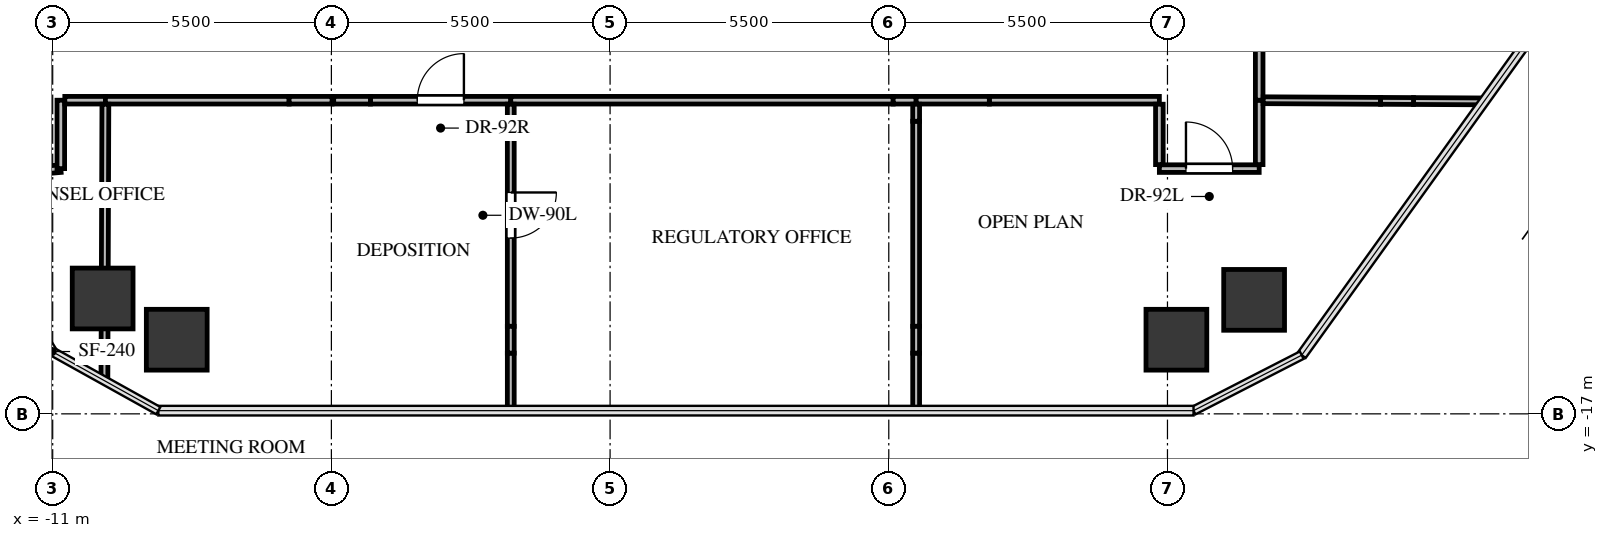
"""IFC4 building model, lengths in metres.
Left out: names, types, materials, properties, quantities, classifications, styles, units other than length and angle.
Written with IfcOpenShell. Run it as: python <this file> out.ifc"""

import sys

from ifc_helpers import new_model, si_unit, direction, frame, frame_2d, origin, origin_2d, place, context, subcontext, project, spatial, rectangle, extrude, source, transform, mapped, element, fill, save


model = new_model("IFC4")
c1 = context("Model", 3, precision=1e-05, world=origin(), true_north=direction((0.0, 1.0)))
c2 = subcontext(c1, "Body", "Model", "MODEL_VIEW")
j1 = project(units=[si_unit("LENGTHUNIT", "METRE"), si_unit("PLANEANGLEUNIT", "RADIAN")], contexts=[c1])
p1 = place(None, origin())
s1 = spatial("IfcSite", under=j1, at=p1, CompositionType="ELEMENT")
p2 = place(p1, origin())
s2 = spatial("IfcBuilding", under=s1, at=p2, CompositionType="ELEMENT")
p3 = place(p2, frame((0.0, 0.0, 143.1)))
s3 = spatial("IfcBuildingStorey", under=s2, at=p3, CompositionType="ELEMENT", Elevation=143.1)
m1 = source(origin(), c2, "Body", "SweptSolid", [
    extrude(rectangle(XDim=1.2, YDim=1.2, at=origin_2d()), origin(), (0.0, 0.0, 1.0), 3.0),
])
for number, where, z_axis, x_axis in (
    (1, (-10.014, -14.723, -0.24), (0.0, 0.0, 1.0), (1.0, 0.0, 0.0)),
    (2, (12.71, -14.75, -0.24), (0.0, 0.0, 1.0), (1.0, 0.0, 0.0)),
    (3, (11.176, -15.537, -0.24), (0.0, 0.0, 1.0), (1.0, 0.0, 0.0)),
    (4, (-8.552, -15.537, -0.24), (0.0, 0.0, 1.0), (1.0, 0.0, 0.0)),
):
    element("IfcColumn", number, at=place(p3, frame(where, z_axis=z_axis, x_axis=x_axis)), inside=s3, PredefinedType="COLUMN", context=c2, shape_type="MappedRepresentation", body=[
        mapped(m1, transform((0.0, 0.0, 0.0), x_axis=(1.0, 0.0, 0.0), y_axis=(0.0, 1.0, 0.0), z_axis=(0.0, 0.0, 1.0), scale=1.0)),
    ])
p4 = place(p3, frame((-11.27, -12.197, 0.0), z_axis=(0.0, 0.0, 1.0), x_axis=(0.996291394281, 0.086043347688, 0.0)))
e5 = element("IfcWall", 5, at=p4, inside=s3, PredefinedType="PARTITIONING", context=c2, shape_type="SweptSolid", body=[
    extrude(rectangle(XDim=0.431, YDim=0.15, at=frame_2d((0.216, 0.0))), origin(), (0.0, 0.0, 1.0), 2.745),
])
p5 = place(p3, frame((-10.84, -12.16, 0.0), z_axis=(0.0, 0.0, 1.0), x_axis=(0.0, 1.0, 0.0)))
e6 = element("IfcWall", 6, at=p5, inside=s3, PredefinedType="PARTITIONING", context=c2, shape_type="SweptSolid", body=[
    extrude(rectangle(XDim=1.35, YDim=0.15, at=frame_2d((0.675, 0.0))), origin(), (0.0, 0.0, 1.0), 2.745),
])
p6 = place(p3, frame((-10.761, -10.81, 0.0), z_axis=(0.0, 0.0, 1.0), x_axis=(1.0, 0.0, 0.0)))
e7 = element("IfcWall", 7, at=p6, inside=s3, PredefinedType="PARTITIONING", context=c2, shape_type="SweptSolid", body=[
    extrude(rectangle(XDim=0.801, YDim=0.15, at=frame_2d((0.4, 0.0))), origin(), (0.0, 0.0, 1.0), 2.745),
])
p7 = place(p3, frame((-9.96, -10.81, 0.0), z_axis=(0.0, 0.0, 1.0), x_axis=(1.0, 0.0, 0.0)))
e8 = element("IfcWall", 8, at=p7, inside=s3, PredefinedType="PARTITIONING", context=c2, shape_type="SweptSolid", body=[
    extrude(rectangle(XDim=3.625, YDim=0.15, at=frame_2d((1.813, 0.0))), origin(), (0.0, 0.0, 1.0), 1.912),
])
p8 = place(p3, frame((-4.729, -10.81, 0.0), z_axis=(0.0, 0.0, 1.0), x_axis=(1.0, 0.0, 0.0)))
e9 = element("IfcWall", 9, at=p8, inside=s3, PredefinedType="PARTITIONING", context=c2, shape_type="SweptSolid", body=[
    extrude(rectangle(XDim=2.77, YDim=0.15, at=frame_2d((1.385, 0.0))), origin(), (0.0, 0.0, 1.0), 2.745),
])
p9 = place(p8, frame((0.925, 0.0, 0.0)))
e10 = element("IfcOpeningElement", 10, at=p9, cuts=e9, PredefinedType="OPENING", context=c2, shape_type="SweptSolid", body=[
    extrude(rectangle(XDim=0.92, YDim=2.1, at=frame_2d((0.46, 1.05))), frame((0.0, 0.085, 0.0), z_axis=(0.0, -1.0, 0.0), x_axis=(1.0, 0.0, 0.0)), (0.0, 0.0, 1.0), 0.17),
])
p10 = place(p3, frame((-6.334, -10.81, 0.0), z_axis=(0.0, 0.0, 1.0), x_axis=(1.0, 0.0, 0.0)))
e11 = element("IfcWall", 11, at=p10, inside=s3, PredefinedType="PARTITIONING", context=c2, shape_type="SweptSolid", body=[
    extrude(rectangle(XDim=0.848, YDim=0.15, at=frame_2d((0.424, 0.0))), origin(), (0.0, 0.0, 1.0), 1.912),
])
p11 = place(p3, frame((-5.455, -10.81, 0.0), z_axis=(0.0, 0.0, 1.0), x_axis=(1.0, 0.0, 0.0)))
e12 = element("IfcWall", 12, at=p11, inside=s3, PredefinedType="PARTITIONING", context=c2, shape_type="SweptSolid", body=[
    extrude(rectangle(XDim=0.725, YDim=0.15, at=frame_2d((0.363, 0.0))), origin(), (0.0, 0.0, 1.0), 1.912),
])
p12 = place(p3, frame((-1.96, -10.81, 0.0), z_axis=(0.0, 0.0, 1.0), x_axis=(1.0, 0.0, 0.0)))
e13 = element("IfcWall", 13, at=p12, inside=s3, PredefinedType="PARTITIONING", context=c2, shape_type="SweptSolid", body=[
    extrude(rectangle(XDim=7.547, YDim=0.15, at=frame_2d((3.773, 0.0))), origin(), (0.0, 0.0, 1.0), 1.912),
])
p13 = place(p3, frame((5.587, -10.81, 0.0), z_axis=(0.0, 0.0, 1.0), x_axis=(1.0, 0.0, 0.0)))
e14 = element("IfcWall", 14, at=p13, inside=s3, PredefinedType="PARTITIONING", context=c2, shape_type="SweptSolid", body=[
    extrude(rectangle(XDim=0.453, YDim=0.15, at=frame_2d((0.227, 0.0))), origin(), (0.0, 0.0, 1.0), 1.912),
])
p14 = place(p3, frame((7.484, -10.81, 0.0), z_axis=(0.0, 0.0, 1.0), x_axis=(1.0, 0.0, 0.0)))
e15 = element("IfcWall", 15, at=p14, inside=s3, PredefinedType="PARTITIONING", context=c2, shape_type="SweptSolid", body=[
    extrude(rectangle(XDim=3.356, YDim=0.15, at=frame_2d((1.678, 0.0))), origin(), (0.0, 0.0, 1.0), 1.912),
])
p15 = place(p3, frame((6.04, -10.81, 0.0), z_axis=(0.0, 0.0, 1.0), x_axis=(1.0, 0.0, 0.0)))
e16 = element("IfcWall", 16, at=p15, inside=s3, PredefinedType="PARTITIONING", context=c2, shape_type="SweptSolid", body=[
    extrude(rectangle(XDim=1.444, YDim=0.15, at=frame_2d((0.722, 0.0))), origin(), (0.0, 0.0, 1.0), 1.912),
])
p16 = place(p3, frame((10.84, -12.16, 0.0), z_axis=(0.0, 0.0, 1.0), x_axis=(1.0, 0.0, 0.0)))
e17 = element("IfcWall", 17, at=p16, inside=s3, PredefinedType="PARTITIONING", context=c2, shape_type="SweptSolid", body=[
    extrude(rectangle(XDim=1.97, YDim=0.15, at=frame_2d((0.985, 0.0))), origin(), (0.0, 0.0, 1.0), 2.745),
])
p17 = place(p16, frame((0.525, 0.0, 0.0)))
e18 = element("IfcOpeningElement", 18, at=p17, cuts=e17, PredefinedType="OPENING", context=c2, shape_type="SweptSolid", body=[
    extrude(rectangle(XDim=0.92, YDim=2.1, at=frame_2d((0.46, 1.05))), frame((0.0, 0.085, 0.0), z_axis=(0.0, -1.0, 0.0), x_axis=(1.0, 0.0, 0.0)), (0.0, 0.0, 1.0), 0.17),
])
p18 = place(p3, frame((10.84, -10.889, 0.0), z_axis=(0.0, 0.0, 1.0), x_axis=(0.0, -1.0, 0.0)))
e19 = element("IfcWall", 19, at=p18, inside=s3, PredefinedType="PARTITIONING", context=c2, shape_type="SweptSolid", body=[
    extrude(rectangle(XDim=1.192, YDim=0.15, at=frame_2d((0.596, 0.0))), origin(), (0.0, 0.0, 1.0), 2.745),
])
p19 = place(p3, frame((12.81, -12.081, 0.0), z_axis=(0.0, 0.0, 1.0), x_axis=(0.0, 1.0, 0.0)))
e20 = element("IfcWall", 20, at=p19, inside=s3, PredefinedType="PARTITIONING", context=c2, shape_type="SweptSolid", body=[
    extrude(rectangle(XDim=1.271, YDim=0.15, at=frame_2d((0.635, 0.0))), origin(), (0.0, 0.0, 1.0), 2.745),
])
p20 = place(p3, frame((12.81, -10.81, 0.0), z_axis=(0.0, 0.0, 1.0), x_axis=(0.0, 1.0, 0.0)))
e21 = element("IfcWall", 21, at=p20, inside=s3, PredefinedType="PARTITIONING", context=c2, shape_type="SweptSolid", body=[
    extrude(rectangle(XDim=2.37, YDim=0.15, at=frame_2d((1.185, 0.0))), origin(), (0.0, 0.0, 1.0), 2.745),
])
p21 = place(p3, frame((-9.96, -10.889, 0.0), z_axis=(0.0, 0.0, 1.0), x_axis=(-0.003528457908, -0.999993774973, 0.0)))
e22 = element("IfcWall", 22, at=p21, inside=s3, PredefinedType="PARTITIONING", context=c2, shape_type="SweptSolid", body=[
    extrude(rectangle(XDim=3.39, YDim=0.135, at=frame_2d((1.695, 0.0))), origin(), (0.0, 0.0, 1.0), 1.912),
])
p22 = place(p3, frame((-9.975, -15.048, 0.0), z_axis=(0.0, 0.0, 1.0), x_axis=(-0.003576784349, -0.999993603286, 0.0)))
e23 = element("IfcWall", 23, at=p22, inside=s3, PredefinedType="PARTITIONING", context=c2, shape_type="SweptSolid", body=[
    extrude(rectangle(XDim=1.297, YDim=0.135, at=frame_2d((0.648, 0.0))), origin(), (0.0, 0.0, 1.0), 2.745),
])
p23 = place(p3, frame((-9.972, -14.279, 0.0), z_axis=(0.0, 0.0, 1.0), x_axis=(-0.003494260751, -0.999993895052, 0.0)))
e24 = element("IfcWall", 24, at=p23, inside=s3, PredefinedType="PARTITIONING", context=c2, shape_type="SweptSolid", body=[
    extrude(rectangle(XDim=0.769, YDim=0.135, at=frame_2d((0.384, 0.0))), origin(), (0.0, 0.0, 1.0), 1.577),
])
p24 = place(p3, frame((-1.96, -10.889, 0.0), z_axis=(0.0, 0.0, 1.0), x_axis=(0.0, -1.0, 0.0)))
e25 = element("IfcWall", 25, at=p24, inside=s3, PredefinedType="PARTITIONING", context=c2, shape_type="SweptSolid", body=[
    extrude(rectangle(XDim=4.384, YDim=0.135, at=frame_2d((2.192, 0.0))), origin(), (0.0, 0.0, 1.0), 2.745),
])
p25 = place(p24, frame((1.742, 0.0, 0.0)))
e26 = element("IfcOpeningElement", 26, at=p25, cuts=e25, PredefinedType="OPENING", context=c2, shape_type="SweptSolid", body=[
    extrude(rectangle(XDim=0.9, YDim=2.05, at=frame_2d((0.45, 1.025))), frame((0.0, 0.078, 0.0), z_axis=(0.0, -1.0, 0.0), x_axis=(1.0, 0.0, 0.0)), (0.0, 0.0, 1.0), 0.155),
])
p26 = place(p3, frame((-1.96, -15.802, 0.0), z_axis=(0.0, 0.0, 1.0), x_axis=(0.0, -1.0, 0.0)))
e27 = element("IfcWall", 27, at=p26, inside=s3, PredefinedType="PARTITIONING", context=c2, shape_type="SweptSolid", body=[
    extrude(rectangle(XDim=1.135, YDim=0.135, at=frame_2d((0.568, 0.0))), origin(), (0.0, 0.0, 1.0), 2.745),
])
p27 = place(p3, frame((-1.96, -15.272, 0.0), z_axis=(0.0, 0.0, 1.0), x_axis=(0.0, -1.0, 0.0)))
e28 = element("IfcWall", 28, at=p27, inside=s3, PredefinedType="PARTITIONING", context=c2, shape_type="SweptSolid", body=[
    extrude(rectangle(XDim=0.529, YDim=0.135, at=frame_2d((0.265, 0.0))), origin(), (0.0, 0.0, 1.0), 2.08),
])
p28 = place(p3, frame((6.04, -11.225, 0.0), z_axis=(0.0, 0.0, 1.0), x_axis=(0.0, -1.0, 0.0)))
e29 = element("IfcWall", 29, at=p28, inside=s3, PredefinedType="PARTITIONING", context=c2, shape_type="SweptSolid", body=[
    extrude(rectangle(XDim=4.047, YDim=0.135, at=frame_2d((2.023, 0.0))), origin(), (0.0, 0.0, 1.0), 2.745),
])
p29 = place(p3, frame((6.04, -15.802, 0.0), z_axis=(0.0, 0.0, 1.0), x_axis=(0.0, -1.0, 0.0)))
e30 = element("IfcWall", 30, at=p29, inside=s3, PredefinedType="PARTITIONING", context=c2, shape_type="SweptSolid", body=[
    extrude(rectangle(XDim=1.135, YDim=0.135, at=frame_2d((0.568, 0.0))), origin(), (0.0, 0.0, 1.0), 2.745),
])
p30 = place(p3, frame((6.04, -10.889, 0.0), z_axis=(0.0, 0.0, 1.0), x_axis=(0.0, -1.0, 0.0)))
e31 = element("IfcWall", 31, at=p30, inside=s3, PredefinedType="PARTITIONING", context=c2, shape_type="SweptSolid", body=[
    extrude(rectangle(XDim=0.336, YDim=0.135, at=frame_2d((0.168, 0.0))), origin(), (0.0, 0.0, 1.0), 1.912),
])
p31 = place(p3, frame((6.04, -15.272, 0.0), z_axis=(0.0, 0.0, 1.0), x_axis=(0.0, -1.0, 0.0)))
e32 = element("IfcWall", 32, at=p31, inside=s3, PredefinedType="PARTITIONING", context=c2, shape_type="SweptSolid", body=[
    extrude(rectangle(XDim=0.529, YDim=0.135, at=frame_2d((0.265, 0.0))), origin(), (0.0, 0.0, 1.0), 2.08),
])
p32 = place(p3, frame((12.889, -10.81, 0.0), z_axis=(0.0, 0.0, 1.0), x_axis=(0.999986120669, -0.005268630773, 0.0)))
e33 = element("IfcWall", 33, at=p32, inside=s3, PredefinedType="PARTITIONING", context=c2, shape_type="SweptSolid", body=[
    extrude(rectangle(XDim=2.317, YDim=0.135, at=frame_2d((1.158, 0.0))), origin(), (0.0, 0.0, 1.0), 2.745),
])
p33 = place(p3, frame((15.855, -10.826, 0.0), z_axis=(0.0, 0.0, 1.0), x_axis=(0.999986174138, -0.005258472432, 0.0)))
e34 = element("IfcWall", 34, at=p33, inside=s3, PredefinedType="PARTITIONING", context=c2, shape_type="SweptSolid", body=[
    extrude(rectangle(XDim=1.393, YDim=0.135, at=frame_2d((0.696, 0.0))), origin(), (0.0, 0.0, 1.0), 2.745),
])
p34 = place(p3, frame((15.206, -10.823, 0.0), z_axis=(0.0, 0.0, 1.0), x_axis=(0.999986139453, -0.005265064292, 0.0)))
e35 = element("IfcWall", 35, at=p34, inside=s3, PredefinedType="PARTITIONING", context=c2, shape_type="SweptSolid", body=[
    extrude(rectangle(XDim=0.649, YDim=0.135, at=frame_2d((0.325, 0.0))), origin(), (0.0, 0.0, 1.0), 2.08),
])
m2 = source(origin(), c2, "Body", "SweptSolid", [
    extrude(rectangle(XDim=0.92, YDim=2.1, at=frame_2d((0.46, 1.05))), frame((0.0, 0.025, 0.0), z_axis=(0.0, -1.0, 0.0), x_axis=(1.0, 0.0, 0.0)), (0.0, 0.0, 1.0), 0.05),
])
p35 = place(p9, origin())
e36 = element("IfcDoor", 36, at=p35, inside=s3, OperationType="SINGLE_SWING_RIGHT", PredefinedType="DOOR", context=c2, shape_type="MappedRepresentation", body=[
    mapped(m2, transform((0.0, 0.0, 0.0), x_axis=(1.0, 0.0, 0.0), y_axis=(0.0, 1.0, 0.0), z_axis=(0.0, 0.0, 1.0), scale=1.0)),
])
fill(e10, e36)
m3 = source(origin(), c2, "Body", "SweptSolid", [
    extrude(rectangle(XDim=0.92, YDim=2.1, at=frame_2d((0.46, 1.05))), frame((0.0, 0.025, 0.0), z_axis=(0.0, -1.0, 0.0), x_axis=(1.0, 0.0, 0.0)), (0.0, 0.0, 1.0), 0.05),
])
p36 = place(p17, origin())
e37 = element("IfcDoor", 37, at=p36, inside=s3, OperationType="SINGLE_SWING_LEFT", PredefinedType="DOOR", context=c2, shape_type="MappedRepresentation", body=[
    mapped(m3, transform((0.0, 0.0, 0.0), x_axis=(1.0, 0.0, 0.0), y_axis=(0.0, 1.0, 0.0), z_axis=(0.0, 0.0, 1.0), scale=1.0)),
])
fill(e18, e37)
m4 = source(origin(), c2, "Body", "SweptSolid", [
    extrude(rectangle(XDim=0.9, YDim=2.05, at=frame_2d((0.45, 1.025))), frame((0.0, 0.025, 0.0), z_axis=(0.0, -1.0, 0.0), x_axis=(1.0, 0.0, 0.0)), (0.0, 0.0, 1.0), 0.05),
])
p37 = place(p25, origin())
e38 = element("IfcDoor", 38, at=p37, inside=s3, OperationType="SINGLE_SWING_LEFT", PredefinedType="DOOR", context=c2, shape_type="MappedRepresentation", body=[
    mapped(m4, transform((0.0, 0.0, 0.0), x_axis=(1.0, 0.0, 0.0), y_axis=(0.0, 1.0, 0.0), z_axis=(0.0, 0.0, 1.0), scale=1.0)),
])
fill(e26, e38)
save(model, sys.argv[1])
